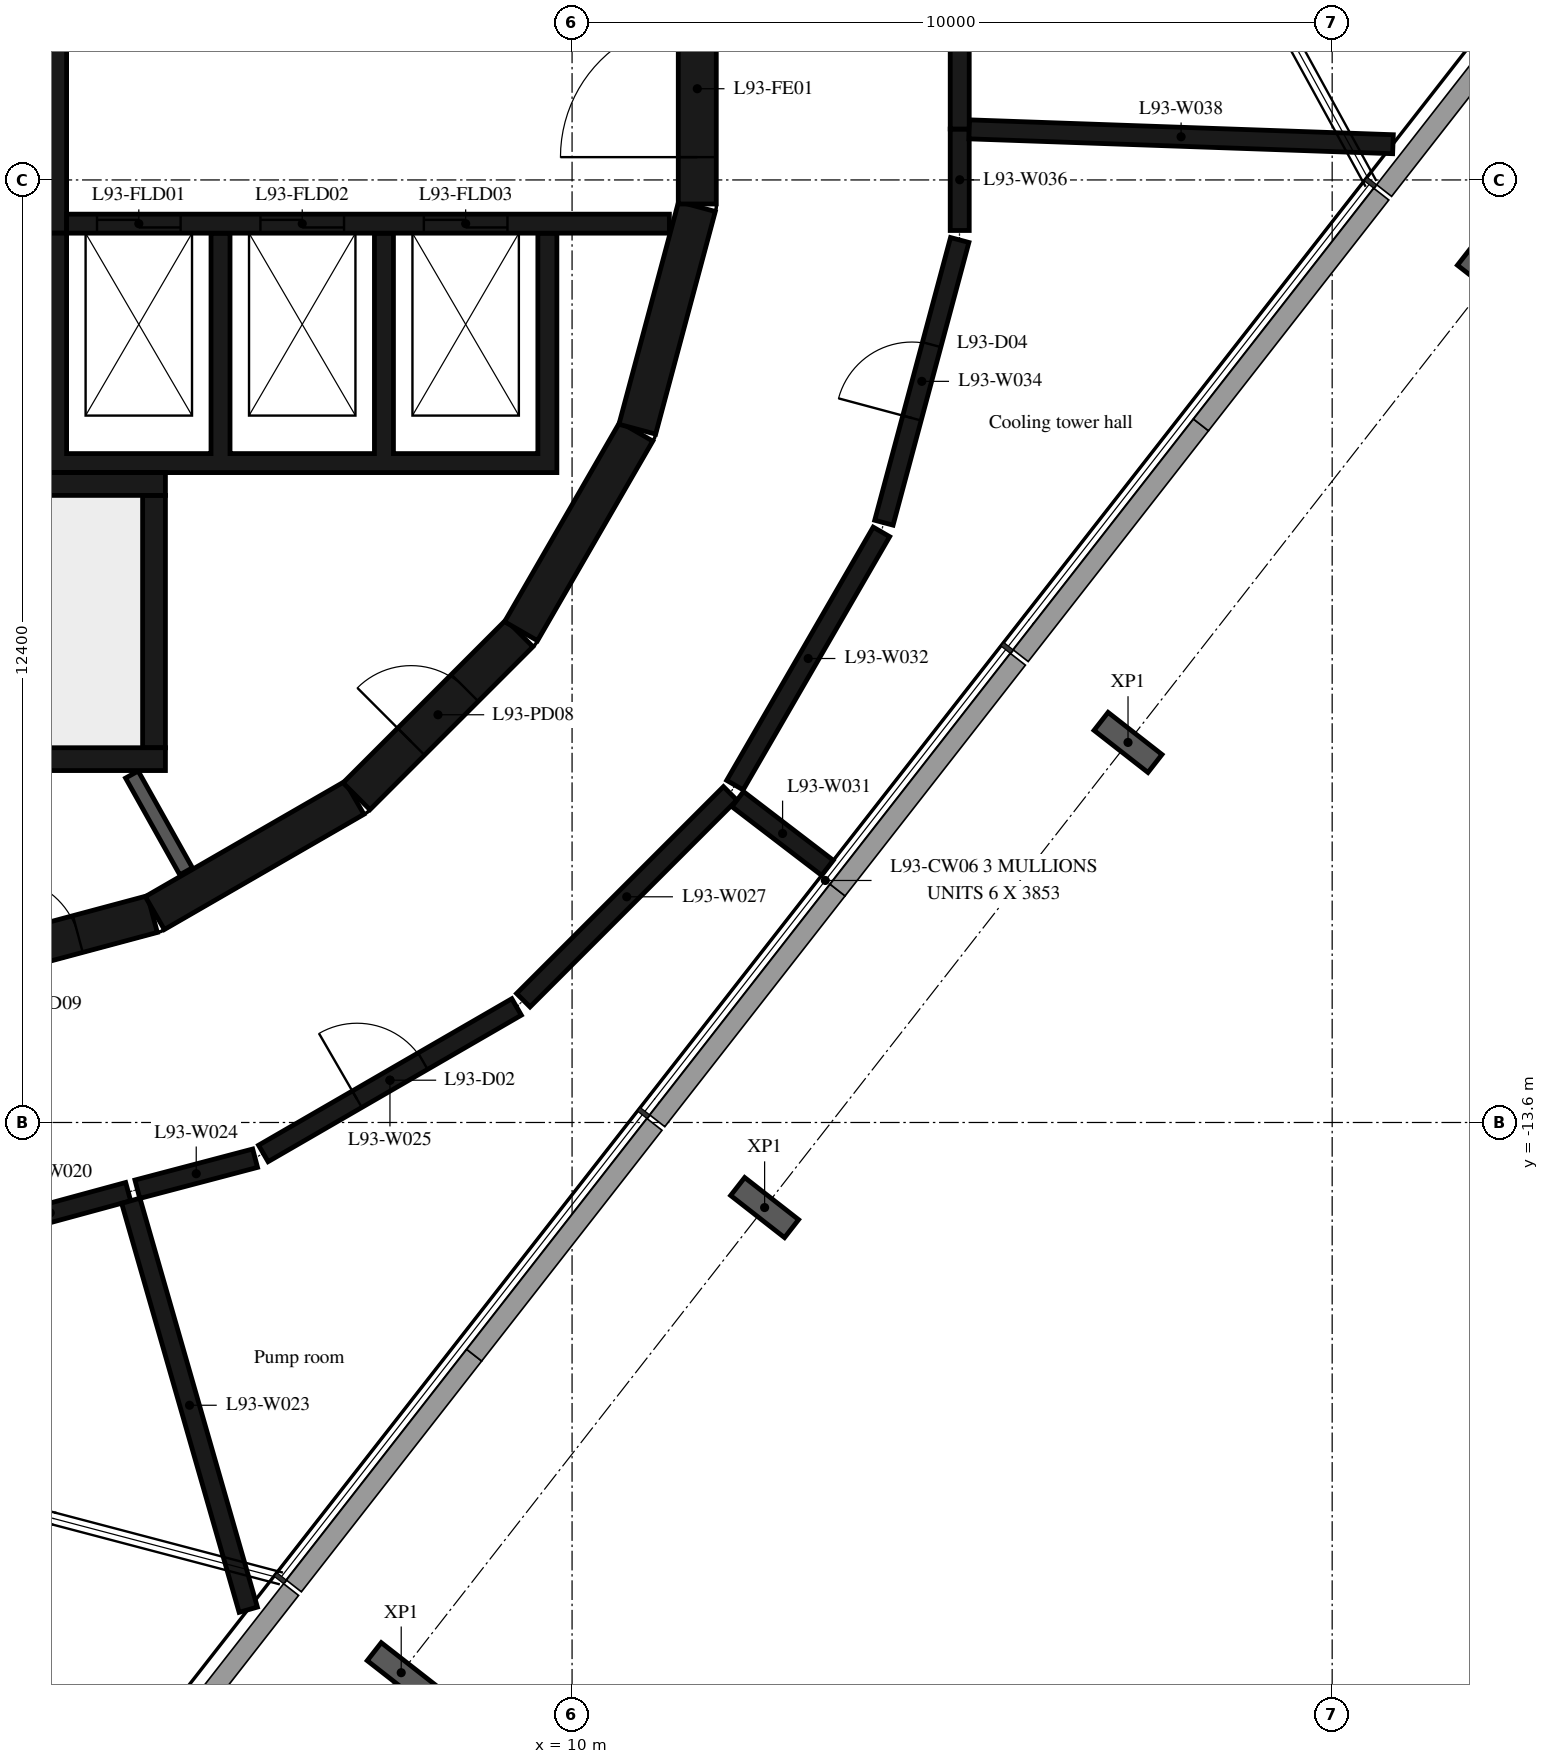
"""IFC4 building model, lengths in metres.
Left out: names, types, materials, properties, quantities, classifications, styles, units other than length and angle.
Written with IfcOpenShell. Run it as: python <this file> out.ifc"""

import sys

from ifc_helpers import new_model, si_unit, direction, frame, frame_2d, origin, origin_2d, place, context, subcontext, project, spatial, polyline, rectangle, i_section, outline, extrude, element, fill, save


model = new_model("IFC4")
c1 = context("Model", 3, precision=1e-05, world=origin(), true_north=direction((0.0, 1.0)))
c2 = subcontext(c1, "Body", "Model", "MODEL_VIEW")
j1 = project(units=[si_unit("LENGTHUNIT", "METRE"), si_unit("PLANEANGLEUNIT", "RADIAN")], contexts=[c1])
p1 = place(None, origin())
s1 = spatial("IfcSite", under=j1, at=p1, CompositionType="ELEMENT")
p2 = place(p1, origin())
s2 = spatial("IfcBuilding", under=s1, at=p2, CompositionType="ELEMENT")
p3 = place(p2, frame((0.0, 0.0, 361.0)))
s3 = spatial("IfcBuildingStorey", under=s2, at=p3, CompositionType="ELEMENT", Elevation=361.0)
for number, where, z_axis, x_axis in (
    (1, (17.314, -8.6, -0.38), (0.0, 0.0, 1.0), (-0.616, -0.788, 0.0)),
    (2, (22.095, -2.481, -0.38), (0.0, 0.0, 1.0), (-0.616, -0.788, 0.0)),
    (3, (7.752, -20.839, -0.38), (0.0, 0.0, 1.0), (-0.616, -0.788, 0.0)),
    (4, (12.533, -14.719, -0.38), (0.0, 0.0, 1.0), (-0.616, -0.788, 0.0)),
):
    element("IfcColumn", number, at=place(p3, frame(where, z_axis=z_axis, x_axis=x_axis)), inside=s3, PredefinedType="COLUMN", context=c2, shape_type="SweptSolid", body=[
        extrude(i_section(OverallWidth=0.3, OverallDepth=0.9, WebThickness=0.019, FlangeThickness=0.035, FilletRadius=0.03, at=origin_2d()), origin(), (0.0, 0.0, 1.0), 5.2),
    ])
p4 = place(p3, frame((1.55, -11.643, 0.0), z_axis=(0.0, 0.0, 1.0), x_axis=(0.965948410781, 0.258734743916, 0.0)))
e5 = element("IfcWall", 5, at=p4, inside=s3, PredefinedType="SHEAR", context=c2, shape_type="SweptSolid", body=[
    extrude(rectangle(XDim=3.033, YDim=0.5, at=frame_2d((1.516, 0.0))), origin(), (0.0, 0.0, 1.0), 4.82),
])
p5 = place(p4, frame((1.016, 0.0, 0.0)))
e6 = element("IfcOpeningElement", 6, at=p5, cuts=e5, PredefinedType="OPENING", context=c2, shape_type="SweptSolid", body=[
    extrude(rectangle(XDim=1.0, YDim=2.4, at=frame_2d((0.5, 1.2))), frame((0.0, 0.26, 0.0), z_axis=(0.0, -1.0, 0.0), x_axis=(1.0, 0.0, 0.0)), (0.0, 0.0, 1.0), 0.52),
])
p6 = place(p3, frame((4.51, -10.845, 0.0), z_axis=(0.0, 0.0, 1.0), x_axis=(0.865975092491, 0.500087131594, 0.0)))
e7 = element("IfcWall", 7, at=p6, inside=s3, PredefinedType="SHEAR", context=c2, shape_type="SweptSolid", body=[
    extrude(rectangle(XDim=3.033, YDim=0.5, at=frame_2d((1.516, 0.0))), origin(), (0.0, 0.0, 1.0), 4.82),
])
p7 = place(p3, frame((7.164, -9.308, 0.0), z_axis=(0.0, 0.0, 1.0), x_axis=(0.707106781187, 0.707106781187, 0.0)))
e8 = element("IfcWall", 8, at=p7, inside=s3, PredefinedType="SHEAR", context=c2, shape_type="SweptSolid", body=[
    extrude(rectangle(XDim=3.032, YDim=0.5, at=frame_2d((1.516, 0.0))), origin(), (0.0, 0.0, 1.0), 4.82),
])
p8 = place(p7, frame((1.016, 0.0, 0.0)))
e9 = element("IfcOpeningElement", 9, at=p8, cuts=e8, PredefinedType="OPENING", context=c2, shape_type="SweptSolid", body=[
    extrude(rectangle(XDim=1.0, YDim=2.4, at=frame_2d((0.5, 1.2))), frame((0.0, 0.26, 0.0), z_axis=(0.0, -1.0, 0.0), x_axis=(1.0, 0.0, 0.0)), (0.0, 0.0, 1.0), 0.52),
])
for number, where, z_axis, x_axis in (
    (10, (9.329, -7.137, 0.0), (0.0, 0.0, 1.0), (0.5, 0.866, 0.0)),
    (11, (10.858, -4.479, 0.0), (0.0, 0.0, 1.0), (0.259, 0.966, 0.0)),
):
    element("IfcWall", number, at=place(p3, frame(where, z_axis=z_axis, x_axis=x_axis)), inside=s3, PredefinedType="SHEAR", context=c2, shape_type="SweptSolid", body=[
        extrude(rectangle(XDim=3.033, YDim=0.5, at=frame_2d((1.516, 0.0))), origin(), (0.0, 0.0, 1.0), 4.82),
    ])
p9 = place(p3, frame((11.647, -1.516, 0.0), z_axis=(0.0, 0.0, 1.0), x_axis=(0.0, 1.0, 0.0)))
e12 = element("IfcWall", 12, at=p9, inside=s3, PredefinedType="SHEAR", context=c2, shape_type="SweptSolid", body=[
    extrude(rectangle(XDim=3.033, YDim=0.5, at=frame_2d((1.516, 0.0))), origin(), (0.0, 0.0, 1.0), 4.82),
])
p10 = place(p9, frame((0.616, 0.0, 0.0)))
e13 = element("IfcOpeningElement", 13, at=p10, cuts=e12, PredefinedType="OPENING", context=c2, shape_type="SweptSolid", body=[
    extrude(rectangle(XDim=1.8, YDim=2.1, at=frame_2d((0.9, 1.05))), frame((0.0, 0.26, 0.0), z_axis=(0.0, -1.0, 0.0), x_axis=(1.0, 0.0, 0.0)), (0.0, 0.0, 1.0), 0.52),
])
p11 = place(p3, frame((-2.4, -5.2, 0.0), z_axis=(0.0, 0.0, 1.0), x_axis=(1.0, 0.0, 0.0)))
e14 = element("IfcWall", 14, at=p11, inside=s3, PredefinedType="SHEAR", context=c2, shape_type="SweptSolid", body=[
    extrude(rectangle(XDim=7.05, YDim=0.3, at=frame_2d((3.525, 0.0))), origin(), (0.0, 0.0, 1.0), 4.82),
])
p12 = place(p3, frame((4.5, -8.67, 0.0), z_axis=(0.0, 0.0, 1.0), x_axis=(0.0, 1.0, 0.0)))
e15 = element("IfcWall", 15, at=p12, inside=s3, PredefinedType="SHEAR", context=c2, shape_type="SweptSolid", body=[
    extrude(rectangle(XDim=3.32, YDim=0.3, at=frame_2d((1.66, 0.0))), origin(), (0.0, 0.0, 1.0), 4.82),
])
p13 = place(p3, frame((0.1, -8.82, 0.0), z_axis=(0.0, 0.0, 1.0), x_axis=(1.0, 0.0, 0.0)))
e16 = element("IfcWall", 16, at=p13, inside=s3, PredefinedType="SHEAR", context=c2, shape_type="SweptSolid", body=[
    extrude(rectangle(XDim=4.55, YDim=0.3, at=frame_2d((2.275, 0.0))), origin(), (0.0, 0.0, 1.0), 4.82),
])
p14 = place(p3, origin())
e17 = element("IfcWall", 17, at=p14, inside=s3, PredefinedType="SHEAR", context=c2, shape_type="SweptSolid", body=[
    extrude(outline(polyline([(9.8, -5.05), (9.8, -4.8), (9.8, -1.9), (9.55, -1.9), (9.55, -4.8), (7.65, -4.8), (7.65, -1.9), (7.4, -1.9), (7.4, -4.8), (5.5, -4.8), (5.5, -1.9), (5.25, -1.9), (5.25, -4.8), (3.35, -4.8), (3.35, -1.9), (3.1, -1.9), (3.1, -4.8), (1.2, -4.8), (1.2, -1.9), (0.95, -1.9), (0.95, -4.8), (-0.95, -4.8), (-0.95, -1.9), (-1.2, -1.9), (-1.2, -4.8), (-3.1, -4.8), (-3.1, -1.9), (-3.35, -1.9), (-3.35, -4.8), (-5.25, -4.8), (-5.25, -1.9), (-5.5, -1.9), (-5.5, -4.8), (-9.55, -4.8), (-9.55, -1.9), (-9.8, -1.9), (-9.8, -4.8), (-9.8, -5.05), (9.8, -5.05)])), origin(), (0.0, 0.0, 1.0), 4.82),
])
p15 = place(p3, frame((3.35, -1.775, 0.0), z_axis=(0.0, 0.0, 1.0), x_axis=(1.0, 0.0, 0.0)))
e18 = element("IfcWall", 18, at=p15, inside=s3, PredefinedType="SHEAR", context=c2, shape_type="SweptSolid", body=[
    extrude(rectangle(XDim=7.93, YDim=0.25, at=frame_2d((3.965, 0.0))), origin(), (0.0, 0.0, 1.0), 4.82),
])
p16 = place(p15, frame((0.4, 0.0, 0.0)))
e19 = element("IfcOpeningElement", 19, at=p16, cuts=e18, PredefinedType="OPENING", context=c2, shape_type="SweptSolid", body=[
    extrude(rectangle(XDim=1.1, YDim=2.4, at=frame_2d((0.55, 1.2))), frame((0.0, 0.135, 0.0), z_axis=(0.0, -1.0, 0.0), x_axis=(1.0, 0.0, 0.0)), (0.0, 0.0, 1.0), 0.27),
])
p17 = place(p15, frame((2.55, 0.0, 0.0)))
e20 = element("IfcOpeningElement", 20, at=p17, cuts=e18, PredefinedType="OPENING", context=c2, shape_type="SweptSolid", body=[
    extrude(rectangle(XDim=1.1, YDim=2.4, at=frame_2d((0.55, 1.2))), frame((0.0, 0.135, 0.0), z_axis=(0.0, -1.0, 0.0), x_axis=(1.0, 0.0, 0.0)), (0.0, 0.0, 1.0), 0.27),
])
p18 = place(p15, frame((4.7, 0.0, 0.0)))
e21 = element("IfcOpeningElement", 21, at=p18, cuts=e18, PredefinedType="OPENING", context=c2, shape_type="SweptSolid", body=[
    extrude(rectangle(XDim=1.1, YDim=2.4, at=frame_2d((0.55, 1.2))), frame((0.0, 0.135, 0.0), z_axis=(0.0, -1.0, 0.0), x_axis=(1.0, 0.0, 0.0)), (0.0, 0.0, 1.0), 0.27),
])
p19 = place(p3, frame((3.225, -1.9, 0.0), z_axis=(0.0, 0.0, 1.0), x_axis=(0.0, 1.0, 0.0)))
e22 = element("IfcWall", 22, at=p19, inside=s3, PredefinedType="SHEAR", context=c2, shape_type="SweptSolid", body=[
    extrude(rectangle(XDim=3.8, YDim=0.25, at=frame_2d((1.9, 0.0))), origin(), (0.0, 0.0, 1.0), 4.82),
])
p20 = place(p3, frame((4.922, -10.296, 0.0), z_axis=(0.0, 0.0, 1.0), x_axis=(-0.48860846254, 0.872503163509, 0.0)))
e23 = element("IfcWall", 23, at=p20, inside=s3, PredefinedType="PARTITIONING", context=c2, shape_type="SweptSolid", body=[
    extrude(rectangle(XDim=1.459, YDim=0.19, at=frame_2d((0.73, 0.0))), origin(), (0.0, 0.0, 1.0), 4.82),
])
p21 = place(p3, frame((2.111, -15.067, 0.0), z_axis=(0.0, 0.0, 1.0), x_axis=(0.964975741564, 0.262339128216, 0.0)))
e24 = element("IfcWall", 24, at=p21, inside=s3, PredefinedType="PARTITIONING", context=c2, shape_type="SweptSolid", body=[
    extrude(rectangle(XDim=2.124, YDim=0.25, at=frame_2d((1.062, 0.0))), origin(), (0.0, 0.0, 1.0), 4.82),
])
p22 = place(p3, frame((4.195, -14.63, 0.0), z_axis=(0.0, 0.0, 1.0), x_axis=(0.276091885253, -0.961131245407, 0.0)))
e25 = element("IfcWall", 25, at=p22, inside=s3, PredefinedType="PARTITIONING", context=c2, shape_type="SweptSolid", body=[
    extrude(rectangle(XDim=5.597, YDim=0.25, at=frame_2d((2.799, 0.0))), origin(), (0.0, 0.0, 1.0), 4.43),
])
p23 = place(p3, frame((4.281, -14.478, 0.0), z_axis=(0.0, 0.0, 1.0), x_axis=(0.966999489871, 0.254778308709, 0.0)))
e26 = element("IfcWall", 26, at=p23, inside=s3, PredefinedType="PARTITIONING", context=c2, shape_type="SweptSolid", body=[
    extrude(rectangle(XDim=1.602, YDim=0.25, at=frame_2d((0.801, 0.0))), origin(), (0.0, 0.0, 1.0), 4.82),
])
p24 = place(p3, frame((5.938, -14.007, 0.0), z_axis=(0.0, 0.0, 1.0), x_axis=(0.865615852585, 0.500708693508, 0.0)))
e27 = element("IfcWall", 27, at=p24, inside=s3, PredefinedType="PARTITIONING", context=c2, shape_type="SweptSolid", body=[
    extrude(rectangle(XDim=3.849, YDim=0.25, at=frame_2d((1.925, 0.0))), origin(), (0.0, 0.0, 1.0), 4.82),
])
p25 = place(p24, frame((1.425, 0.0, 0.0)))
e28 = element("IfcOpeningElement", 28, at=p25, cuts=e27, PredefinedType="OPENING", context=c2, shape_type="SweptSolid", body=[
    extrude(rectangle(XDim=1.0, YDim=2.1, at=frame_2d((0.5, 1.05))), frame((0.0, 0.135, 0.0), z_axis=(0.0, -1.0, 0.0), x_axis=(1.0, 0.0, 0.0)), (0.0, 0.0, 1.0), 0.27),
])
p26 = place(p3, frame((9.358, -11.992, 0.0), z_axis=(0.0, 0.0, 1.0), x_axis=(0.707106781187, 0.707106781187, 0.0)))
e29 = element("IfcWall", 29, at=p26, inside=s3, PredefinedType="PARTITIONING", context=c2, shape_type="SweptSolid", body=[
    extrude(rectangle(XDim=3.849, YDim=0.25, at=frame_2d((1.925, 0.0))), origin(), (0.0, 0.0, 1.0), 4.82),
])
p27 = place(p3, frame((12.179, -9.346, 0.0), z_axis=(0.0, 0.0, 1.0), x_axis=(0.794031553294, -0.607876543694, 0.0)))
e30 = element("IfcWall", 30, at=p27, inside=s3, PredefinedType="PARTITIONING", context=c2, shape_type="SweptSolid", body=[
    extrude(rectangle(XDim=1.487, YDim=0.25, at=frame_2d((0.744, 0.0))), origin(), (0.0, 0.0, 1.0), 4.82),
])
p28 = place(p3, frame((12.143, -9.162, 0.0), z_axis=(0.0, 0.0, 1.0), x_axis=(0.500756218026, 0.865588360659, 0.0)))
e31 = element("IfcWall", 31, at=p28, inside=s3, PredefinedType="PARTITIONING", context=c2, shape_type="SweptSolid", body=[
    extrude(rectangle(XDim=3.849, YDim=0.25, at=frame_2d((1.925, 0.0))), origin(), (0.0, 0.0, 1.0), 4.82),
])
p29 = place(p3, frame((14.102, -5.709, 0.0), z_axis=(0.0, 0.0, 1.0), x_axis=(0.259118468411, 0.965845546311, 0.0)))
e32 = element("IfcWall", 32, at=p29, inside=s3, PredefinedType="PARTITIONING", context=c2, shape_type="SweptSolid", body=[
    extrude(rectangle(XDim=3.851, YDim=0.25, at=frame_2d((1.925, 0.0))), origin(), (0.0, 0.0, 1.0), 4.82),
])
p30 = place(p29, frame((1.425, 0.0, 0.0)))
e33 = element("IfcOpeningElement", 33, at=p30, cuts=e32, PredefinedType="OPENING", context=c2, shape_type="SweptSolid", body=[
    extrude(rectangle(XDim=1.0, YDim=2.1, at=frame_2d((0.5, 1.05))), frame((0.0, 0.135, 0.0), z_axis=(0.0, -1.0, 0.0), x_axis=(1.0, 0.0, 0.0)), (0.0, 0.0, 1.0), 0.27),
])
p31 = place(p3, frame((15.1, -1.865, 0.0), z_axis=(0.0, 0.0, 1.0), x_axis=(0.0, 1.0, 0.0)))
e34 = element("IfcWall", 34, at=p31, inside=s3, PredefinedType="PARTITIONING", context=c2, shape_type="SweptSolid", body=[
    extrude(rectangle(XDim=1.335, YDim=0.25, at=frame_2d((0.667, 0.0))), origin(), (0.0, 0.0, 1.0), 4.82),
])
p32 = place(p3, frame((15.1, -0.53, 0.0), z_axis=(0.0, 0.0, 1.0), x_axis=(0.0, 1.0, 0.0)))
e35 = element("IfcWall", 35, at=p32, inside=s3, PredefinedType="PARTITIONING", context=c2, shape_type="SweptSolid", body=[
    extrude(rectangle(XDim=2.52, YDim=0.25, at=frame_2d((1.26, 0.0))), origin(), (0.0, 0.0, 1.0), 4.82),
])
p33 = place(p3, frame((15.225, -0.534, 0.0), z_axis=(0.0, 0.0, 1.0), x_axis=(0.999385397325, -0.035054637557, 0.0)))
e36 = element("IfcWall", 36, at=p33, inside=s3, PredefinedType="PARTITIONING", context=c2, shape_type="SweptSolid", body=[
    extrude(rectangle(XDim=5.579, YDim=0.25, at=frame_2d((2.789, 0.0))), origin(), (0.0, 0.0, 1.0), 4.43),
])
p34 = place(p10, origin())
e37 = element("IfcDoor", 37, at=p34, inside=s3, OperationType="DOUBLE_DOOR_SINGLE_SWING", PredefinedType="DOOR", context=c2, shape_type="SweptSolid", body=[
    extrude(rectangle(XDim=1.8, YDim=2.1, at=frame_2d((0.9, 1.05))), frame((0.0, 0.025, 0.0), z_axis=(0.0, -1.0, 0.0), x_axis=(1.0, 0.0, 0.0)), (0.0, 0.0, 1.0), 0.05),
])
fill(e13, e37)
p35 = place(p16, origin())
e38 = element("IfcDoor", 38, at=p35, inside=s3, OperationType="DOUBLE_DOOR_SLIDING", PredefinedType="DOOR", context=c2, shape_type="SweptSolid", body=[
    extrude(rectangle(XDim=1.1, YDim=2.4, at=frame_2d((0.55, 1.2))), frame((0.0, 0.025, 0.0), z_axis=(0.0, -1.0, 0.0), x_axis=(1.0, 0.0, 0.0)), (0.0, 0.0, 1.0), 0.05),
])
fill(e19, e38)
p36 = place(p17, origin())
e39 = element("IfcDoor", 39, at=p36, inside=s3, OperationType="DOUBLE_DOOR_SLIDING", PredefinedType="DOOR", context=c2, shape_type="SweptSolid", body=[
    extrude(rectangle(XDim=1.1, YDim=2.4, at=frame_2d((0.55, 1.2))), frame((0.0, 0.025, 0.0), z_axis=(0.0, -1.0, 0.0), x_axis=(1.0, 0.0, 0.0)), (0.0, 0.0, 1.0), 0.05),
])
fill(e20, e39)
p37 = place(p18, origin())
e40 = element("IfcDoor", 40, at=p37, inside=s3, OperationType="DOUBLE_DOOR_SLIDING", PredefinedType="DOOR", context=c2, shape_type="SweptSolid", body=[
    extrude(rectangle(XDim=1.1, YDim=2.4, at=frame_2d((0.55, 1.2))), frame((0.0, 0.025, 0.0), z_axis=(0.0, -1.0, 0.0), x_axis=(1.0, 0.0, 0.0)), (0.0, 0.0, 1.0), 0.05),
])
fill(e21, e40)
p38 = place(p8, origin())
e41 = element("IfcDoor", 41, at=p38, inside=s3, OperationType="SINGLE_SWING_LEFT", PredefinedType="DOOR", context=c2, shape_type="SweptSolid", body=[
    extrude(rectangle(XDim=1.0, YDim=2.4, at=frame_2d((0.5, 1.2))), frame((0.0, 0.025, 0.0), z_axis=(0.0, -1.0, 0.0), x_axis=(1.0, 0.0, 0.0)), (0.0, 0.0, 1.0), 0.05),
])
fill(e9, e41)
p39 = place(p5, origin())
e42 = element("IfcDoor", 42, at=p39, inside=s3, OperationType="SINGLE_SWING_RIGHT", PredefinedType="DOOR", context=c2, shape_type="SweptSolid", body=[
    extrude(rectangle(XDim=1.0, YDim=2.4, at=frame_2d((0.5, 1.2))), frame((0.0, 0.025, 0.0), z_axis=(0.0, -1.0, 0.0), x_axis=(1.0, 0.0, 0.0)), (0.0, 0.0, 1.0), 0.05),
])
fill(e6, e42)
p40 = place(p25, origin())
e43 = element("IfcDoor", 43, at=p40, inside=s3, OperationType="SINGLE_SWING_LEFT", PredefinedType="DOOR", context=c2, shape_type="SweptSolid", body=[
    extrude(rectangle(XDim=1.0, YDim=2.1, at=frame_2d((0.5, 1.05))), frame((0.0, 0.025, 0.0), z_axis=(0.0, -1.0, 0.0), x_axis=(1.0, 0.0, 0.0)), (0.0, 0.0, 1.0), 0.05),
])
fill(e28, e43)
p41 = place(p30, origin())
e44 = element("IfcDoor", 44, at=p41, inside=s3, OperationType="SINGLE_SWING_LEFT", PredefinedType="DOOR", context=c2, shape_type="SweptSolid", body=[
    extrude(rectangle(XDim=1.0, YDim=2.1, at=frame_2d((0.5, 1.05))), frame((0.0, 0.025, 0.0), z_axis=(0.0, -1.0, 0.0), x_axis=(1.0, 0.0, 0.0)), (0.0, 0.0, 1.0), 0.05),
])
fill(e33, e44)
save(model, sys.argv[1])
